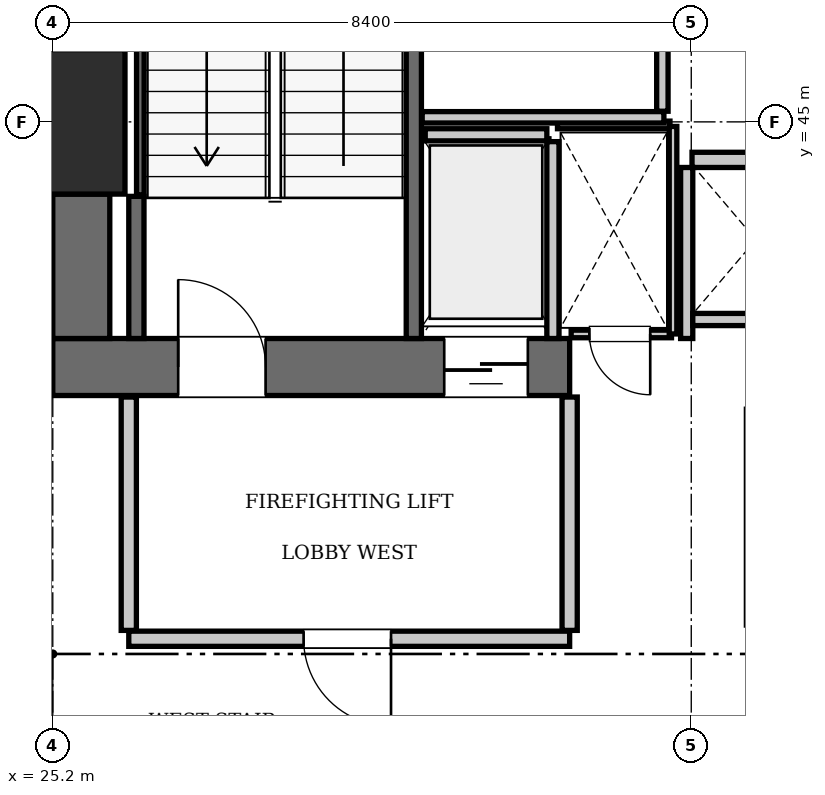
"""IFC4 building model, lengths in metres.
Left out: names, types, materials, properties, quantities, classifications, styles, units other than length and angle.
Written with IfcOpenShell. Run it as: python <this file> out.ifc"""

import sys

from ifc_helpers import new_model, si_unit, direction, frame, frame_2d, origin, origin_2d, place, context, subcontext, project, spatial, rectangle, extrude, element, fill, save


model = new_model("IFC4")
c1 = context("Model", 3, precision=1e-05, world=origin(), true_north=direction((0.0, 1.0)))
c2 = subcontext(c1, "Body", "Model", "MODEL_VIEW")
j1 = project(units=[si_unit("LENGTHUNIT", "METRE"), si_unit("PLANEANGLEUNIT", "RADIAN")], contexts=[c1])
p1 = place(None, origin())
s1 = spatial("IfcSite", under=j1, at=p1, CompositionType="ELEMENT")
p2 = place(p1, origin())
s2 = spatial("IfcBuilding", under=s1, at=p2, CompositionType="ELEMENT")
p3 = place(p2, frame((0.0, 0.0, 196.7)))
s3 = spatial("IfcBuildingStorey", under=s2, at=p3, CompositionType="ELEMENT", Elevation=196.7)
p4 = place(p3, frame((25.2, 45.0, 0.0), z_axis=(0.0, 0.0, 1.0), x_axis=(1.0, 0.0, 0.0)))
e1 = element("IfcColumn", 1, at=p4, inside=s3, PredefinedType="COLUMN", context=c2, shape_type="SweptSolid", body=[
    extrude(rectangle(XDim=1.9, YDim=1.9, at=origin_2d()), origin(), (0.0, 0.0, 1.0), 3.85),
])
p5 = place(p3, frame((25.2, 41.775, 0.0), z_axis=(0.0, 0.0, 1.0), x_axis=(1.0, 0.0, 0.0)))
e2 = element("IfcWall", 2, at=p5, inside=s3, PredefinedType="SHEAR", context=c2, shape_type="SweptSolid", body=[
    extrude(rectangle(XDim=6.8, YDim=0.75, at=frame_2d((3.4, 0.0))), origin(), (0.0, 0.0, 1.0), 3.85),
])
p6 = place(p5, frame((1.65, 0.0, 0.0)))
e3 = element("IfcOpeningElement", 3, at=p6, cuts=e2, PredefinedType="OPENING", context=c2, shape_type="SweptSolid", body=[
    extrude(rectangle(XDim=1.15, YDim=2.15, at=frame_2d((0.575, 1.075))), frame((0.0, 0.385, 0.0), z_axis=(0.0, -1.0, 0.0), x_axis=(1.0, 0.0, 0.0)), (0.0, 0.0, 1.0), 0.77),
])
p7 = place(p5, frame((5.15, 0.0, 0.0)))
e4 = element("IfcOpeningElement", 4, at=p7, cuts=e2, PredefinedType="OPENING", context=c2, shape_type="SweptSolid", body=[
    extrude(rectangle(XDim=1.1, YDim=2.2, at=frame_2d((0.55, 1.1))), frame((0.0, 0.385, 0.0), z_axis=(0.0, -1.0, 0.0), x_axis=(1.0, 0.0, 0.0)), (0.0, 0.0, 1.0), 0.77),
])
p8 = place(p3, frame((25.575, 42.15, 0.0), z_axis=(0.0, 0.0, 1.0), x_axis=(0.0, 1.0, 0.0)))
e5 = element("IfcWall", 5, at=p8, inside=s3, PredefinedType="SHEAR", context=c2, shape_type="SweptSolid", body=[
    extrude(rectangle(XDim=1.9, YDim=0.75, at=frame_2d((0.95, 0.0))), origin(), (0.0, 0.0, 1.0), 3.85),
])
p9 = place(p3, frame((29.95, 42.15, 0.0), z_axis=(0.0, 0.0, 1.0), x_axis=(0.0, 1.0, 0.0)))
e6 = element("IfcWall", 6, at=p9, inside=s3, PredefinedType="SOLIDWALL", context=c2, shape_type="SweptSolid", body=[
    extrude(rectangle(XDim=9.0, YDim=0.2, at=frame_2d((4.5, 0.0))), origin(), (0.0, 0.0, 1.0), 3.61),
])
p10 = place(p3, frame((26.3, 42.15, 0.0), z_axis=(0.0, 0.0, 1.0), x_axis=(0.0, 1.0, 0.0)))
e7 = element("IfcWall", 7, at=p10, inside=s3, PredefinedType="SOLIDWALL", context=c2, shape_type="SweptSolid", body=[
    extrude(rectangle(XDim=1.87, YDim=0.2, at=frame_2d((0.935, 0.0))), origin(), (0.0, 0.0, 1.0), 3.61),
])
p11 = place(p3, frame((26.352, 44.04, 0.0), z_axis=(0.0, 0.0, 1.0), x_axis=(0.0, 1.0, 0.0)))
e8 = element("IfcWall", 8, at=p11, inside=s3, PredefinedType="SOLIDWALL", context=c2, shape_type="SweptSolid", body=[
    extrude(rectangle(XDim=1.92, YDim=0.1, at=frame_2d((0.96, 0.0))), origin(), (0.0, 0.0, 1.0), 3.61),
])
p12 = place(p3, frame((33.61, 44.5, 0.0), z_axis=(0.0, 0.0, 1.0), x_axis=(1.0, 0.0, 0.0)))
e9 = element("IfcWall", 9, at=p12, inside=s3, PredefinedType="SOLIDWALL", context=c2, shape_type="SweptSolid", body=[
    extrude(rectangle(XDim=1.68, YDim=0.2, at=frame_2d((0.84, 0.0))), origin(), (0.0, 0.0, 1.0), 3.61),
])
p13 = place(p3, frame((30.1, 44.83, 0.0), z_axis=(0.0, 0.0, 1.0), x_axis=(1.0, 0.0, 0.0)))
e10 = element("IfcWall", 10, at=p13, inside=s3, PredefinedType="SOLIDWALL", context=c2, shape_type="SweptSolid", body=[
    extrude(rectangle(XDim=1.6, YDim=0.16, at=frame_2d((0.8, 0.0))), origin(), (0.0, 0.0, 1.0), 3.61),
])
p14 = place(p3, frame((31.78, 42.15, 0.0), z_axis=(0.0, 0.0, 1.0), x_axis=(0.0, 1.0, 0.0)))
e11 = element("IfcWall", 11, at=p14, inside=s3, PredefinedType="SOLIDWALL", context=c2, shape_type="SweptSolid", body=[
    extrude(rectangle(XDim=2.59, YDim=0.16, at=frame_2d((1.295, 0.0))), origin(), (0.0, 0.0, 1.0), 3.61),
])
p15 = place(p3, frame((33.54, 42.15, 0.0), z_axis=(0.0, 0.0, 1.0), x_axis=(0.0, 1.0, 0.0)))
e12 = element("IfcWall", 12, at=p15, inside=s3, PredefinedType="SOLIDWALL", context=c2, shape_type="SweptSolid", body=[
    extrude(rectangle(XDim=2.25, YDim=0.16, at=frame_2d((1.125, 0.0))), origin(), (0.0, 0.0, 1.0), 3.61),
])
p16 = place(p3, frame((33.62, 42.4, 0.0), z_axis=(0.0, 0.0, 1.0), x_axis=(1.0, 0.0, 0.0)))
e13 = element("IfcWall", 13, at=p16, inside=s3, PredefinedType="SOLIDWALL", context=c2, shape_type="SweptSolid", body=[
    extrude(rectangle(XDim=1.66, YDim=0.16, at=frame_2d((0.83, 0.0))), origin(), (0.0, 0.0, 1.0), 3.61),
])
p17 = place(p3, frame((26.2, 38.2, 0.0), z_axis=(0.0, 0.0, 1.0), x_axis=(1.0, 0.0, 0.0)))
e14 = element("IfcWall", 14, at=p17, inside=s3, PredefinedType="PARTITIONING", context=c2, shape_type="SweptSolid", body=[
    extrude(rectangle(XDim=5.8, YDim=0.2, at=frame_2d((2.9, 0.0))), origin(), (0.0, 0.0, 1.0), 3.61),
])
p18 = place(p17, frame((2.3, 0.0, 0.0)))
e15 = element("IfcOpeningElement", 15, at=p18, cuts=e14, PredefinedType="OPENING", context=c2, shape_type="SweptSolid", body=[
    extrude(rectangle(XDim=1.15, YDim=2.15, at=frame_2d((0.575, 1.075))), frame((0.0, 0.11, 0.0), z_axis=(0.0, -1.0, 0.0), x_axis=(1.0, 0.0, 0.0)), (0.0, 0.0, 1.0), 0.22),
])
for number, where, z_axis, x_axis in (
    (16, (26.2, 38.31, 0.0), (0.0, 0.0, 1.0), (0.0, 1.0, 0.0)),
    (17, (32.0, 38.31, 0.0), (0.0, 0.0, 1.0), (0.0, 1.0, 0.0)),
):
    element("IfcWall", number, at=place(p3, frame(where, z_axis=z_axis, x_axis=x_axis)), inside=s3, PredefinedType="PARTITIONING", context=c2, shape_type="SweptSolid", body=[
        extrude(rectangle(XDim=3.07, YDim=0.2, at=frame_2d((1.535, 0.0))), origin(), (0.0, 0.0, 1.0), 3.61),
    ])
p19 = place(p3, frame((32.02, 42.21, 0.0), z_axis=(0.0, 0.0, 1.0), x_axis=(1.0, 0.0, 0.0)))
e18 = element("IfcWall", 18, at=p19, inside=s3, PredefinedType="PARTITIONING", context=c2, shape_type="SweptSolid", body=[
    extrude(rectangle(XDim=1.32, YDim=0.1, at=frame_2d((0.66, 0.0))), origin(), (0.0, 0.0, 1.0), 3.61),
])
p20 = place(p19, frame((0.24, 0.0, 0.0)))
e19 = element("IfcOpeningElement", 19, at=p20, cuts=e18, PredefinedType="OPENING", context=c2, shape_type="SweptSolid", body=[
    extrude(rectangle(XDim=0.8, YDim=2.05, at=frame_2d((0.4, 1.025))), frame((0.0, 0.06, 0.0), z_axis=(0.0, -1.0, 0.0), x_axis=(1.0, 0.0, 0.0)), (0.0, 0.0, 1.0), 0.12),
])
p21 = place(p3, frame((31.84, 44.96, 0.0), z_axis=(0.0, 0.0, 1.0), x_axis=(1.0, 0.0, 0.0)))
e20 = element("IfcWall", 20, at=p21, inside=s3, PredefinedType="PARTITIONING", context=c2, shape_type="SweptSolid", body=[
    extrude(rectangle(XDim=1.48, YDim=0.1, at=frame_2d((0.74, 0.0))), origin(), (0.0, 0.0, 1.0), 3.61),
])
p22 = place(p3, frame((33.36, 42.21, 0.0), z_axis=(0.0, 0.0, 1.0), x_axis=(0.0, 1.0, 0.0)))
e21 = element("IfcWall", 21, at=p22, inside=s3, PredefinedType="PARTITIONING", context=c2, shape_type="SweptSolid", body=[
    extrude(rectangle(XDim=2.73, YDim=0.1, at=frame_2d((1.365, 0.0))), origin(), (0.0, 0.0, 1.0), 3.61),
])
p23 = place(p3, frame((30.06, 45.06, 0.0), z_axis=(0.0, 0.0, 1.0), x_axis=(1.0, 0.0, 0.0)))
e22 = element("IfcWall", 22, at=p23, inside=s3, PredefinedType="PARTITIONING", context=c2, shape_type="SweptSolid", body=[
    extrude(rectangle(XDim=3.18, YDim=0.15, at=frame_2d((1.59, 0.0))), origin(), (0.0, 0.0, 1.0), 3.61),
])
p24 = place(p3, frame((33.22, 45.14, 0.0), z_axis=(0.0, 0.0, 1.0), x_axis=(0.0, 1.0, 0.0)))
e23 = element("IfcWall", 23, at=p24, inside=s3, PredefinedType="PARTITIONING", context=c2, shape_type="SweptSolid", body=[
    extrude(rectangle(XDim=4.16, YDim=0.15, at=frame_2d((2.08, 0.0))), origin(), (0.0, 0.0, 1.0), 3.61),
])
p25 = place(p6, origin())
e24 = element("IfcDoor", 24, at=p25, inside=s3, OperationType="SINGLE_SWING_LEFT", PredefinedType="DOOR", context=c2, shape_type="SweptSolid", body=[
    extrude(rectangle(XDim=1.15, YDim=2.15, at=frame_2d((0.575, 1.075))), frame((0.0, 0.025, 0.0), z_axis=(0.0, -1.0, 0.0), x_axis=(1.0, 0.0, 0.0)), (0.0, 0.0, 1.0), 0.05),
])
fill(e3, e24)
p26 = place(p7, frame((1.1, 0.0, 0.0), z_axis=(0.0, 0.0, 1.0), x_axis=(-1.0, 0.0, 0.0)))
e25 = element("IfcDoor", 25, at=p26, inside=s3, OperationType="SLIDING_TO_LEFT", PredefinedType="DOOR", context=c2, shape_type="SweptSolid", body=[
    extrude(rectangle(XDim=1.1, YDim=2.2, at=frame_2d((0.55, 1.1))), frame((0.0, 0.025, 0.0), z_axis=(0.0, -1.0, 0.0), x_axis=(1.0, 0.0, 0.0)), (0.0, 0.0, 1.0), 0.05),
])
fill(e4, e25)
p27 = place(p18, frame((1.15, 0.0, 0.0), z_axis=(0.0, 0.0, 1.0), x_axis=(-1.0, 0.0, 0.0)))
e26 = element("IfcDoor", 26, at=p27, inside=s3, OperationType="SINGLE_SWING_LEFT", PredefinedType="DOOR", context=c2, shape_type="SweptSolid", body=[
    extrude(rectangle(XDim=1.15, YDim=2.15, at=frame_2d((0.575, 1.075))), frame((0.0, 0.025, 0.0), z_axis=(0.0, -1.0, 0.0), x_axis=(1.0, 0.0, 0.0)), (0.0, 0.0, 1.0), 0.05),
])
fill(e15, e26)
p28 = place(p20, frame((0.8, 0.0, 0.0), z_axis=(0.0, 0.0, 1.0), x_axis=(-1.0, 0.0, 0.0)))
e27 = element("IfcDoor", 27, at=p28, inside=s3, OperationType="SINGLE_SWING_LEFT", PredefinedType="DOOR", context=c2, shape_type="SweptSolid", body=[
    extrude(rectangle(XDim=0.8, YDim=2.05, at=frame_2d((0.4, 1.025))), frame((0.0, 0.025, 0.0), z_axis=(0.0, -1.0, 0.0), x_axis=(1.0, 0.0, 0.0)), (0.0, 0.0, 1.0), 0.05),
])
fill(e19, e27)
save(model, sys.argv[1])
